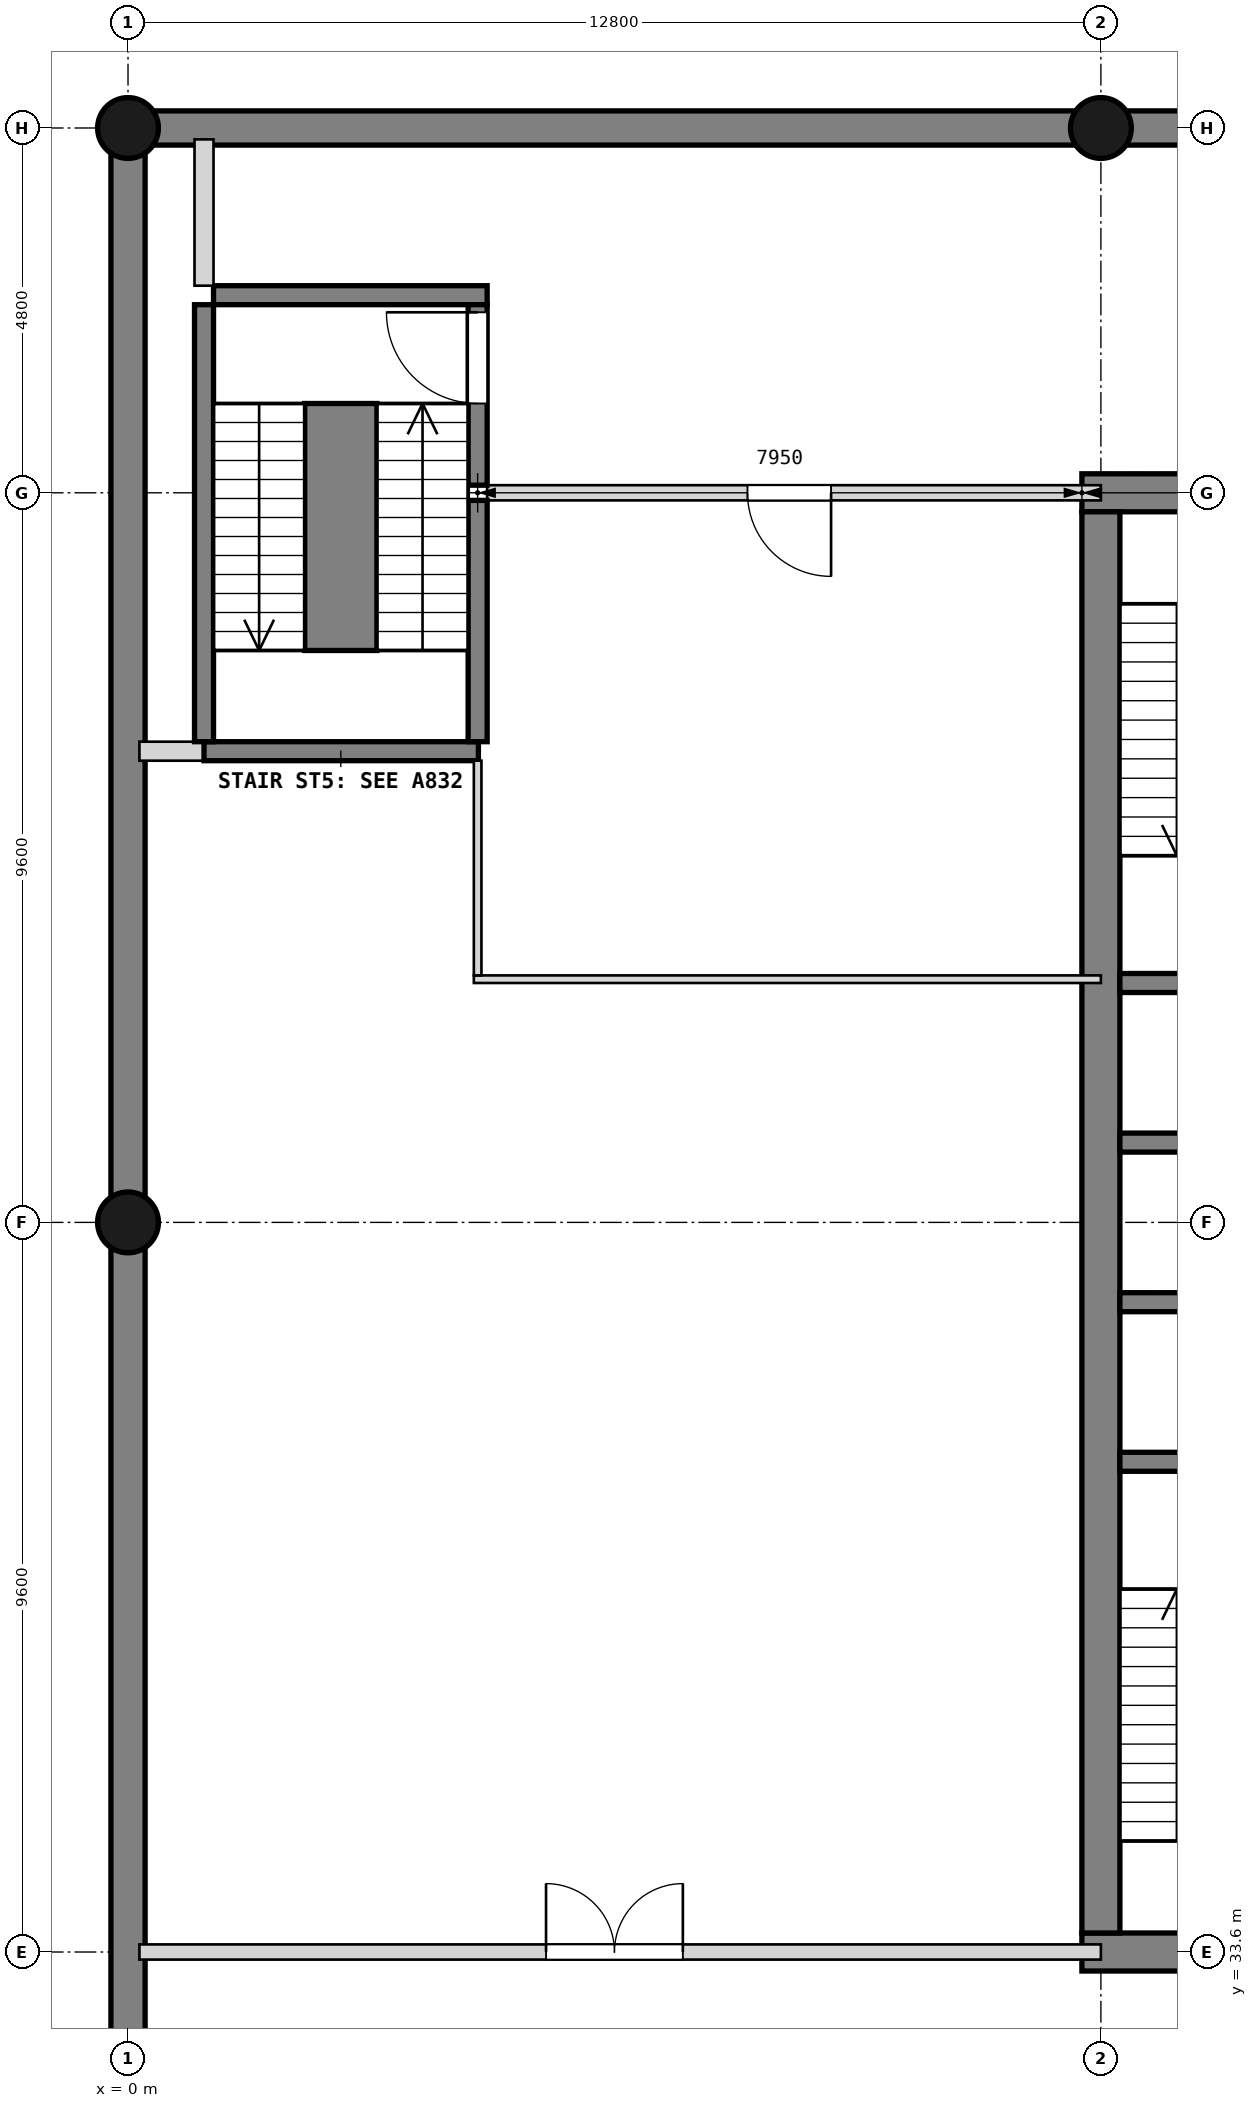
"""IFC4 building model, lengths in metres.
Left out: names, types, materials, properties, quantities, classifications, styles, units other than length and angle.
Written with IfcOpenShell. Run it as: python <this file> out.ifc"""

import sys

from ifc_helpers import new_model, si_unit, direction, frame, frame_2d, origin, origin_2d, place, context, subcontext, project, spatial, rectangle, circle, extrude, element, fill, save


model = new_model("IFC4")
c1 = context("Model", 3, precision=1e-05, world=origin(), true_north=direction((0.0, 1.0)))
c2 = subcontext(c1, "Body", "Model", "MODEL_VIEW")
j1 = project(units=[si_unit("LENGTHUNIT", "METRE"), si_unit("PLANEANGLEUNIT", "RADIAN")], contexts=[c1])
p1 = place(None, origin())
s1 = spatial("IfcSite", under=j1, at=p1, CompositionType="ELEMENT")
p2 = place(p1, origin())
s2 = spatial("IfcBuilding", under=s1, at=p2, CompositionType="ELEMENT")
p3 = place(p2, frame((0.0, 0.0, -4.8)))
s3 = spatial("IfcBuildingStorey", under=s2, at=p3, CompositionType="ELEMENT", Elevation=-4.8)
p4 = place(p3, frame((12.55, 52.8, 0.0), z_axis=(0.0, 0.0, 1.0), x_axis=(1.0, 0.0, 0.0)))
e1 = element("IfcWall", 1, at=p4, inside=s3, PredefinedType="SHEAR", context=c2, shape_type="SweptSolid", body=[
    extrude(rectangle(XDim=13.3, YDim=0.5, at=frame_2d((6.65, 0.0))), origin(), (0.0, 0.0, 1.0), 4.8),
])
p5 = place(p4, frame((4.65, 0.0, 0.0)))
e2 = element("IfcOpeningElement", 2, at=p5, cuts=e1, PredefinedType="OPENING", context=c2, shape_type="SweptSolid", body=[
    extrude(rectangle(XDim=2.0, YDim=2.1, at=frame_2d((1.0, 1.05))), frame((0.0, 0.26, 0.0), z_axis=(0.0, -1.0, 0.0), x_axis=(1.0, 0.0, 0.0)), (0.0, 0.0, 1.0), 0.52),
])
p6 = place(p3, frame((12.55, 33.6, 0.0), z_axis=(0.0, 0.0, 1.0), x_axis=(1.0, 0.0, 0.0)))
e3 = element("IfcWall", 3, at=p6, inside=s3, PredefinedType="SHEAR", context=c2, shape_type="SweptSolid", body=[
    extrude(rectangle(XDim=13.3, YDim=0.5, at=frame_2d((6.65, 0.0))), origin(), (0.0, 0.0, 1.0), 4.8),
])
p7 = place(p6, frame((4.65, 0.0, 0.0)))
e4 = element("IfcOpeningElement", 4, at=p7, cuts=e3, PredefinedType="OPENING", context=c2, shape_type="SweptSolid", body=[
    extrude(rectangle(XDim=2.0, YDim=2.1, at=frame_2d((1.0, 1.05))), frame((0.0, 0.26, 0.0), z_axis=(0.0, -1.0, 0.0), x_axis=(1.0, 0.0, 0.0)), (0.0, 0.0, 1.0), 0.52),
])
p8 = place(p3, frame((12.8, 33.85, 0.0), z_axis=(0.0, 0.0, 1.0), x_axis=(0.0, 1.0, 0.0)))
e5 = element("IfcWall", 5, at=p8, inside=s3, PredefinedType="SHEAR", context=c2, shape_type="SweptSolid", body=[
    extrude(rectangle(XDim=18.7, YDim=0.5, at=frame_2d((9.35, 0.0))), origin(), (0.0, 0.0, 1.0), 4.8),
])
p9 = place(p3, frame((0.0, -0.225, 0.0), z_axis=(0.0, 0.0, 1.0), x_axis=(0.0, 1.0, 0.0)))
e6 = element("IfcWall", 6, at=p9, inside=s3, PredefinedType="SOLIDWALL", context=c2, shape_type="SweptSolid", body=[
    extrude(rectangle(XDim=58.05, YDim=0.45, at=frame_2d((29.025, 0.0))), origin(), (0.0, 0.0, 1.0), 4.8),
])
p10 = place(p3, frame((0.225, 57.6, 0.0), z_axis=(0.0, 0.0, 1.0), x_axis=(1.0, 0.0, 0.0)))
e7 = element("IfcWall", 7, at=p10, inside=s3, PredefinedType="SOLIDWALL", context=c2, shape_type="SweptSolid", body=[
    extrude(rectangle(XDim=25.15, YDim=0.45, at=frame_2d((12.575, 0.0))), origin(), (0.0, 0.0, 1.0), 4.8),
])
for number, where, z_axis, x_axis in (
    (8, (0.0, 43.2, 0.0), (0.0, 0.0, 1.0), (1.0, 0.0, 0.0)),
    (9, (0.0, 57.6, 0.0), (0.0, 0.0, 1.0), (1.0, 0.0, 0.0)),
    (10, (12.8, 57.6, 0.0), (0.0, 0.0, 1.0), (1.0, 0.0, 0.0)),
):
    element("IfcColumn", number, at=place(p3, frame(where, z_axis=z_axis, x_axis=x_axis)), inside=s3, PredefinedType="COLUMN", context=c2, shape_type="SweptSolid", body=[
        extrude(circle(Radius=0.4, at=origin_2d()), origin(), (0.0, 0.0, 1.0), 4.8),
    ])
for number, where, z_axis, x_axis in (
    (11, (13.05, 40.05, 0.0), (0.0, 0.0, 1.0), (1.0, 0.0, 0.0)),
    (12, (13.05, 42.15, 0.0), (0.0, 0.0, 1.0), (1.0, 0.0, 0.0)),
    (13, (13.05, 44.25, 0.0), (0.0, 0.0, 1.0), (1.0, 0.0, 0.0)),
    (14, (13.05, 46.35, 0.0), (0.0, 0.0, 1.0), (1.0, 0.0, 0.0)),
):
    element("IfcWall", number, at=place(p3, frame(where, z_axis=z_axis, x_axis=x_axis)), inside=s3, PredefinedType="SOLIDWALL", context=c2, shape_type="SweptSolid", body=[
        extrude(rectangle(XDim=3.475, YDim=0.25, at=frame_2d((1.737, 0.0))), origin(), (0.0, 0.0, 1.0), 4.5),
    ])
p11 = place(p3, frame((0.15, 33.6, 0.0), z_axis=(0.0, 0.0, 1.0), x_axis=(1.0, 0.0, 0.0)))
e15 = element("IfcWall", 15, at=p11, inside=s3, PredefinedType="PARTITIONING", context=c2, shape_type="SweptSolid", body=[
    extrude(rectangle(XDim=12.65, YDim=0.2, at=frame_2d((6.325, 0.0))), origin(), (0.0, 0.0, 1.0), 4.5),
])
p12 = place(p11, frame((5.35, 0.0, 0.0)))
e16 = element("IfcOpeningElement", 16, at=p12, cuts=e15, PredefinedType="OPENING", context=c2, shape_type="SweptSolid", body=[
    extrude(rectangle(XDim=1.8, YDim=2.1, at=frame_2d((0.9, 1.05))), frame((0.0, 0.11, 0.0), z_axis=(0.0, -1.0, 0.0), x_axis=(1.0, 0.0, 0.0)), (0.0, 0.0, 1.0), 0.22),
])
p13 = place(p3, frame((4.55, 46.4, 0.0), z_axis=(0.0, 0.0, 1.0), x_axis=(1.0, 0.0, 0.0)))
e17 = element("IfcWall", 17, at=p13, inside=s3, PredefinedType="PARTITIONING", context=c2, shape_type="SweptSolid", body=[
    extrude(rectangle(XDim=8.25, YDim=0.1, at=frame_2d((4.125, 0.0))), origin(), (0.0, 0.0, 1.0), 4.5),
])
p14 = place(p3, frame((0.15, 49.4, 0.0), z_axis=(0.0, 0.0, 1.0), x_axis=(1.0, 0.0, 0.0)))
e18 = element("IfcWall", 18, at=p14, inside=s3, PredefinedType="PARTITIONING", context=c2, shape_type="SweptSolid", body=[
    extrude(rectangle(XDim=0.85, YDim=0.25, at=frame_2d((0.425, 0.0))), origin(), (0.0, 0.0, 1.0), 4.5),
])
p15 = place(p3, frame((1.0, 49.4, 0.0), z_axis=(0.0, 0.0, 1.0), x_axis=(1.0, 0.0, 0.0)))
e19 = element("IfcWall", 19, at=p15, inside=s3, PredefinedType="SHEAR", context=c2, shape_type="SweptSolid", body=[
    extrude(rectangle(XDim=3.61, YDim=0.25, at=frame_2d((1.805, 0.0))), origin(), (0.0, 0.0, 1.0), 4.5),
])
p16 = place(p3, frame((4.725, 52.8, 0.0), z_axis=(0.0, 0.0, 1.0), x_axis=(1.0, 0.0, 0.0)))
e20 = element("IfcWall", 20, at=p16, inside=s3, PredefinedType="PARTITIONING", context=c2, shape_type="SweptSolid", body=[
    extrude(rectangle(XDim=8.075, YDim=0.2, at=frame_2d((4.038, 0.0))), origin(), (0.0, 0.0, 1.0), 4.5),
])
p17 = place(p16, frame((3.425, 0.0, 0.0)))
e21 = element("IfcOpeningElement", 21, at=p17, cuts=e20, PredefinedType="OPENING", context=c2, shape_type="SweptSolid", body=[
    extrude(rectangle(XDim=1.1, YDim=2.1, at=frame_2d((0.55, 1.05))), frame((0.0, 0.11, 0.0), z_axis=(0.0, -1.0, 0.0), x_axis=(1.0, 0.0, 0.0)), (0.0, 0.0, 1.0), 0.22),
])
p18 = place(p3, frame((1.125, 55.4, 0.0), z_axis=(0.0, 0.0, 1.0), x_axis=(1.0, 0.0, 0.0)))
e22 = element("IfcWall", 22, at=p18, inside=s3, PredefinedType="SHEAR", context=c2, shape_type="SweptSolid", body=[
    extrude(rectangle(XDim=3.6, YDim=0.25, at=frame_2d((1.8, 0.0))), origin(), (0.0, 0.0, 1.0), 4.5),
])
p19 = place(p3, frame((1.0, 49.525, 0.0), z_axis=(0.0, 0.0, 1.0), x_axis=(0.0, 1.0, 0.0)))
e23 = element("IfcWall", 23, at=p19, inside=s3, PredefinedType="SHEAR", context=c2, shape_type="SweptSolid", body=[
    extrude(rectangle(XDim=5.75, YDim=0.25, at=frame_2d((2.875, 0.0))), origin(), (0.0, 0.0, 1.0), 4.5),
])
p20 = place(p3, frame((1.0, 55.525, 0.0), z_axis=(0.0, 0.0, 1.0), x_axis=(0.0, 1.0, 0.0)))
e24 = element("IfcWall", 24, at=p20, inside=s3, PredefinedType="PARTITIONING", context=c2, shape_type="SweptSolid", body=[
    extrude(rectangle(XDim=1.925, YDim=0.25, at=frame_2d((0.962, 0.0))), origin(), (0.0, 0.0, 1.0), 4.5),
])
p21 = place(p3, frame((4.6, 46.45, 0.0), z_axis=(0.0, 0.0, 1.0), x_axis=(0.0, 1.0, 0.0)))
e25 = element("IfcWall", 25, at=p21, inside=s3, PredefinedType="PARTITIONING", context=c2, shape_type="SweptSolid", body=[
    extrude(rectangle(XDim=2.825, YDim=0.1, at=frame_2d((1.413, 0.0))), origin(), (0.0, 0.0, 1.0), 4.5),
])
p22 = place(p3, frame((4.6, 49.525, 0.0), z_axis=(0.0, 0.0, 1.0), x_axis=(0.0, 1.0, 0.0)))
e26 = element("IfcWall", 26, at=p22, inside=s3, PredefinedType="SHEAR", context=c2, shape_type="SweptSolid", body=[
    extrude(rectangle(XDim=3.175, YDim=0.25, at=frame_2d((1.587, 0.0))), origin(), (0.0, 0.0, 1.0), 4.5),
])
p23 = place(p3, frame((4.6, 52.9, 0.0), z_axis=(0.0, 0.0, 1.0), x_axis=(0.0, 1.0, 0.0)))
e27 = element("IfcWall", 27, at=p23, inside=s3, PredefinedType="SHEAR", context=c2, shape_type="SweptSolid", body=[
    extrude(rectangle(XDim=2.375, YDim=0.25, at=frame_2d((1.188, 0.0))), origin(), (0.0, 0.0, 1.0), 4.5),
])
p24 = place(p23, frame((1.075, 0.0, 0.0)))
e28 = element("IfcOpeningElement", 28, at=p24, cuts=e27, PredefinedType="OPENING", context=c2, shape_type="SweptSolid", body=[
    extrude(rectangle(XDim=1.2, YDim=2.1, at=frame_2d((0.6, 1.05))), frame((0.0, 0.135, 0.0), z_axis=(0.0, -1.0, 0.0), x_axis=(1.0, 0.0, 0.0)), (0.0, 0.0, 1.0), 0.27),
])
p25 = place(p3, frame((2.8, 53.975, 0.0), z_axis=(0.0, 0.0, 1.0), x_axis=(0.0, -1.0, 0.0)))
e29 = element("IfcWall", 29, at=p25, inside=s3, PredefinedType="SHEAR", context=c2, shape_type="SweptSolid", body=[
    extrude(rectangle(XDim=3.25, YDim=0.95, at=frame_2d((1.625, 0.0))), origin(), (0.0, 0.0, 1.0), 4.8),
])
p26 = place(p12, origin())
e30 = element("IfcDoor", 30, at=p26, inside=s3, OperationType="DOUBLE_DOOR_SINGLE_SWING", PredefinedType="DOOR", context=c2, shape_type="SweptSolid", body=[
    extrude(rectangle(XDim=1.8, YDim=2.1, at=frame_2d((0.9, 1.05))), frame((0.0, 0.025, 0.0), z_axis=(0.0, -1.0, 0.0), x_axis=(1.0, 0.0, 0.0)), (0.0, 0.0, 1.0), 0.05),
])
fill(e16, e30)
p27 = place(p17, frame((1.1, 0.0, 0.0), z_axis=(0.0, 0.0, 1.0), x_axis=(-1.0, 0.0, 0.0)))
e31 = element("IfcDoor", 31, at=p27, inside=s3, OperationType="SINGLE_SWING_LEFT", PredefinedType="DOOR", context=c2, shape_type="SweptSolid", body=[
    extrude(rectangle(XDim=1.1, YDim=2.1, at=frame_2d((0.55, 1.05))), frame((0.0, 0.025, 0.0), z_axis=(0.0, -1.0, 0.0), x_axis=(1.0, 0.0, 0.0)), (0.0, 0.0, 1.0), 0.05),
])
fill(e21, e31)
p28 = place(p24, origin())
e32 = element("IfcDoor", 32, at=p28, inside=s3, OperationType="SINGLE_SWING_RIGHT", PredefinedType="DOOR", context=c2, shape_type="SweptSolid", body=[
    extrude(rectangle(XDim=1.2, YDim=2.1, at=frame_2d((0.6, 1.05))), frame((0.0, 0.025, 0.0), z_axis=(0.0, -1.0, 0.0), x_axis=(1.0, 0.0, 0.0)), (0.0, 0.0, 1.0), 0.05),
])
fill(e28, e32)
save(model, sys.argv[1])
